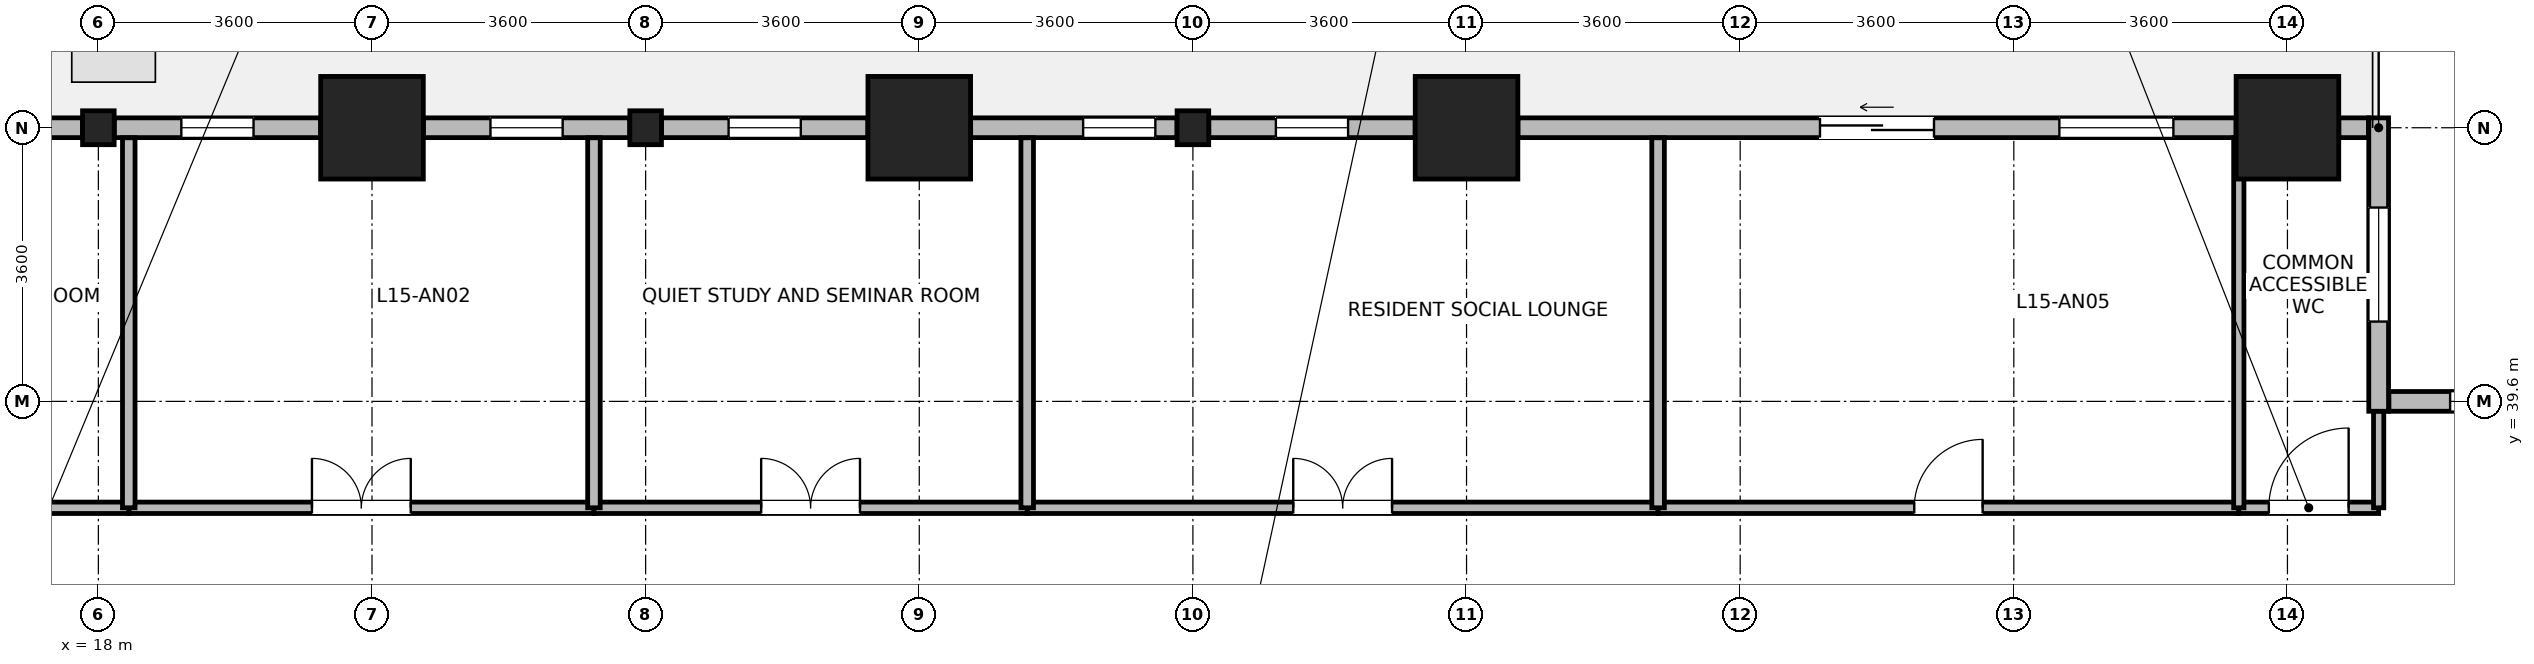
"""IFC4 building model, lengths in metres.
Left out: names, types, materials, properties, quantities, classifications, styles, units other than length and angle.
Written with IfcOpenShell. Run it as: python <this file> out.ifc"""

import sys

from ifc_helpers import new_model, si_unit, direction, frame, frame_2d, origin, origin_2d, place, context, subcontext, project, spatial, rectangle, i_section, extrude, source, transform, mapped, element, fill, save


model = new_model("IFC4")
c1 = context("Model", 3, precision=1e-05, world=origin(), true_north=direction((0.0, 1.0)))
c2 = subcontext(c1, "Body", "Model", "MODEL_VIEW")
j1 = project(units=[si_unit("LENGTHUNIT", "METRE"), si_unit("PLANEANGLEUNIT", "RADIAN")], contexts=[c1])
p1 = place(None, origin())
s1 = spatial("IfcSite", under=j1, at=p1, CompositionType="ELEMENT")
p2 = place(p1, origin())
s2 = spatial("IfcBuilding", under=s1, at=p2, CompositionType="ELEMENT")
p3 = place(p2, frame((0.0, 0.0, 62.3)))
s3 = spatial("IfcBuildingStorey", under=s2, at=p3, CompositionType="ELEMENT", Elevation=62.3)
m1 = source(origin(), c2, "Body", "SweptSolid", [
    extrude(rectangle(XDim=1.35, YDim=1.35, at=origin_2d()), origin(), (0.0, 0.0, 1.0), 3.7),
])
for number, where, z_axis, x_axis in (
    (1, (21.6, 43.2, 0.0), (0.0, 0.0, 1.0), (1.0, 0.0, 0.0)),
    (2, (28.8, 43.2, 0.0), (0.0, 0.0, 1.0), (1.0, 0.0, 0.0)),
    (3, (36.0, 43.2, 0.0), (0.0, 0.0, 1.0), (1.0, 0.0, 0.0)),
    (4, (46.8, 43.2, 0.0), (0.0, 0.0, 1.0), (1.0, 0.0, 0.0)),
):
    element("IfcColumn", number, at=place(p3, frame(where, z_axis=z_axis, x_axis=x_axis)), inside=s3, PredefinedType="COLUMN", context=c2, shape_type="MappedRepresentation", body=[
        mapped(m1, transform((0.0, 0.0, 0.0), x_axis=(1.0, 0.0, 0.0), y_axis=(0.0, 1.0, 0.0), z_axis=(0.0, 0.0, 1.0), scale=1.0)),
    ])
m2 = source(origin(), c2, "Body", "SweptSolid", [
    extrude(i_section(OverallWidth=0.416, OverallDepth=0.446, WebThickness=0.029, FlangeThickness=0.04, FilletRadius=0.015, at=origin_2d()), origin(), (0.0, 0.0, 1.0), 3.7),
])
for number, where, z_axis, x_axis in (
    (5, (18.0, 43.2, 0.0), (0.0, 0.0, 1.0), (1.0, 0.0, 0.0)),
    (6, (25.2, 43.2, 0.0), (0.0, 0.0, 1.0), (1.0, 0.0, 0.0)),
    (7, (32.4, 43.2, 0.0), (0.0, 0.0, 1.0), (1.0, 0.0, 0.0)),
):
    element("IfcColumn", number, at=place(p3, frame(where, z_axis=z_axis, x_axis=x_axis)), inside=s3, PredefinedType="COLUMN", context=c2, shape_type="MappedRepresentation", body=[
        mapped(m2, transform((0.0, 0.0, 0.0), x_axis=(1.0, 0.0, 0.0), y_axis=(0.0, 1.0, 0.0), z_axis=(0.0, 0.0, 1.0), scale=1.0)),
    ])
p4 = place(p3, frame((48.135, 39.6, 0.0), z_axis=(0.0, 0.0, 1.0), x_axis=(1.0, 0.0, 0.0)))
e8 = element("IfcWall", 8, at=p4, inside=s3, PredefinedType="STANDARD", context=c2, shape_type="SweptSolid", body=[
    extrude(rectangle(XDim=9.33, YDim=0.26, at=frame_2d((4.665, 0.0))), origin(), (0.0, 0.0, 1.0), 3.43),
])
p5 = place(p4, frame((0.805, 0.0, 0.85)))
e9 = element("IfcOpeningElement", 9, at=p5, cuts=e8, PredefinedType="OPENING", context=c2, shape_type="SweptSolid", body=[
    extrude(rectangle(XDim=1.5, YDim=1.85, at=frame_2d((0.75, 0.925))), frame((0.0, 0.14, 0.0), z_axis=(0.0, -1.0, 0.0), x_axis=(1.0, 0.0, 0.0)), (0.0, 0.0, 1.0), 0.28),
])
p6 = place(p4, frame((3.915, 0.0, 0.85)))
e10 = element("IfcOpeningElement", 10, at=p6, cuts=e8, PredefinedType="OPENING", context=c2, shape_type="SweptSolid", body=[
    extrude(rectangle(XDim=1.5, YDim=1.85, at=frame_2d((0.75, 0.925))), frame((0.0, 0.14, 0.0), z_axis=(0.0, -1.0, 0.0), x_axis=(1.0, 0.0, 0.0)), (0.0, 0.0, 1.0), 0.28),
])
p7 = place(p4, frame((7.025, 0.0, 0.85)))
e11 = element("IfcOpeningElement", 11, at=p7, cuts=e8, PredefinedType="OPENING", context=c2, shape_type="SweptSolid", body=[
    extrude(rectangle(XDim=1.5, YDim=1.85, at=frame_2d((0.75, 0.925))), frame((0.0, 0.14, 0.0), z_axis=(0.0, -1.0, 0.0), x_axis=(1.0, 0.0, 0.0)), (0.0, 0.0, 1.0), 0.28),
])
p8 = place(p3, frame((48.0, 43.33, 0.0), z_axis=(0.0, 0.0, 1.0), x_axis=(0.0, -1.0, 0.0)))
e12 = element("IfcWall", 12, at=p8, inside=s3, PredefinedType="STANDARD", context=c2, shape_type="SweptSolid", body=[
    extrude(rectangle(XDim=3.86, YDim=0.26, at=frame_2d((1.93, 0.0))), origin(), (0.0, 0.0, 1.0), 3.43),
])
p9 = place(p8, frame((1.18, 0.0, 0.85)))
e13 = element("IfcOpeningElement", 13, at=p9, cuts=e12, PredefinedType="OPENING", context=c2, shape_type="SweptSolid", body=[
    extrude(rectangle(XDim=1.5, YDim=1.85, at=frame_2d((0.75, 0.925))), frame((0.0, 0.14, 0.0), z_axis=(0.0, -1.0, 0.0), x_axis=(1.0, 0.0, 0.0)), (0.0, 0.0, 1.0), 0.28),
])
p10 = place(p3, frame((47.476, 43.2, 0.0), z_axis=(0.0, 0.0, 1.0), x_axis=(1.0, 0.0, 0.0)))
e14 = element("IfcWall", 14, at=p10, inside=s3, PredefinedType="STANDARD", context=c2, shape_type="SweptSolid", body=[
    extrude(rectangle(XDim=0.389, YDim=0.26, at=frame_2d((0.194, 0.0))), origin(), (0.0, 0.0, 1.0), 3.43),
])
p11 = place(p3, frame((36.676, 43.2, 0.0), z_axis=(0.0, 0.0, 1.0), x_axis=(1.0, 0.0, 0.0)))
e15 = element("IfcWall", 15, at=p11, inside=s3, PredefinedType="STANDARD", context=c2, shape_type="SweptSolid", body=[
    extrude(rectangle(XDim=9.448, YDim=0.26, at=frame_2d((4.724, 0.0))), origin(), (0.0, 0.0, 1.0), 2.93),
])
p12 = place(p11, frame((3.974, 0.0, 0.0)))
e16 = element("IfcOpeningElement", 16, at=p12, cuts=e15, PredefinedType="OPENING", context=c2, shape_type="SweptSolid", body=[
    extrude(rectangle(XDim=1.5, YDim=2.15, at=frame_2d((0.75, 1.075))), frame((0.0, 0.14, 0.0), z_axis=(0.0, -1.0, 0.0), x_axis=(1.0, 0.0, 0.0)), (0.0, 0.0, 1.0), 0.28),
])
p13 = place(p11, frame((7.123, 0.0, 0.85)))
e17 = element("IfcOpeningElement", 17, at=p13, cuts=e15, PredefinedType="OPENING", context=c2, shape_type="SweptSolid", body=[
    extrude(rectangle(XDim=1.5, YDim=1.85, at=frame_2d((0.75, 0.925))), frame((0.0, 0.14, 0.0), z_axis=(0.0, -1.0, 0.0), x_axis=(1.0, 0.0, 0.0)), (0.0, 0.0, 1.0), 0.28),
])
p14 = place(p3, frame((32.609, 43.2, 0.0), z_axis=(0.0, 0.0, 1.0), x_axis=(1.0, 0.0, 0.0)))
e18 = element("IfcWall", 18, at=p14, inside=s3, PredefinedType="STANDARD", context=c2, shape_type="SweptSolid", body=[
    extrude(rectangle(XDim=2.715, YDim=0.26, at=frame_2d((1.357, 0.0))), origin(), (0.0, 0.0, 1.0), 2.93),
])
p15 = place(p14, frame((0.883, 0.0, 0.85)))
e19 = element("IfcOpeningElement", 19, at=p15, cuts=e18, PredefinedType="OPENING", context=c2, shape_type="SweptSolid", body=[
    extrude(rectangle(XDim=0.95, YDim=1.75, at=frame_2d((0.475, 0.875))), frame((0.0, 0.14, 0.0), z_axis=(0.0, -1.0, 0.0), x_axis=(1.0, 0.0, 0.0)), (0.0, 0.0, 1.0), 0.28),
])
p16 = place(p3, frame((29.476, 43.2, 0.0), z_axis=(0.0, 0.0, 1.0), x_axis=(1.0, 0.0, 0.0)))
e20 = element("IfcWall", 20, at=p16, inside=s3, PredefinedType="STANDARD", context=c2, shape_type="SweptSolid", body=[
    extrude(rectangle(XDim=2.715, YDim=0.26, at=frame_2d((1.357, 0.0))), origin(), (0.0, 0.0, 1.0), 2.93),
])
p17 = place(p16, frame((1.48, 0.0, 0.85)))
e21 = element("IfcOpeningElement", 21, at=p17, cuts=e20, PredefinedType="OPENING", context=c2, shape_type="SweptSolid", body=[
    extrude(rectangle(XDim=0.95, YDim=1.75, at=frame_2d((0.475, 0.875))), frame((0.0, 0.14, 0.0), z_axis=(0.0, -1.0, 0.0), x_axis=(1.0, 0.0, 0.0)), (0.0, 0.0, 1.0), 0.28),
])
p18 = place(p3, frame((25.409, 43.2, 0.0), z_axis=(0.0, 0.0, 1.0), x_axis=(1.0, 0.0, 0.0)))
e22 = element("IfcWall", 22, at=p18, inside=s3, PredefinedType="STANDARD", context=c2, shape_type="SweptSolid", body=[
    extrude(rectangle(XDim=2.715, YDim=0.26, at=frame_2d((1.357, 0.0))), origin(), (0.0, 0.0, 1.0), 2.93),
])
p19 = place(p18, frame((0.883, 0.0, 0.85)))
e23 = element("IfcOpeningElement", 23, at=p19, cuts=e22, PredefinedType="OPENING", context=c2, shape_type="SweptSolid", body=[
    extrude(rectangle(XDim=0.95, YDim=1.75, at=frame_2d((0.475, 0.875))), frame((0.0, 0.14, 0.0), z_axis=(0.0, -1.0, 0.0), x_axis=(1.0, 0.0, 0.0)), (0.0, 0.0, 1.0), 0.28),
])
p20 = place(p3, frame((22.276, 43.2, 0.0), z_axis=(0.0, 0.0, 1.0), x_axis=(1.0, 0.0, 0.0)))
e24 = element("IfcWall", 24, at=p20, inside=s3, PredefinedType="STANDARD", context=c2, shape_type="SweptSolid", body=[
    extrude(rectangle(XDim=2.715, YDim=0.26, at=frame_2d((1.357, 0.0))), origin(), (0.0, 0.0, 1.0), 2.93),
])
p21 = place(p20, frame((0.883, 0.0, 0.85)))
e25 = element("IfcOpeningElement", 25, at=p21, cuts=e24, PredefinedType="OPENING", context=c2, shape_type="SweptSolid", body=[
    extrude(rectangle(XDim=0.95, YDim=1.75, at=frame_2d((0.475, 0.875))), frame((0.0, 0.14, 0.0), z_axis=(0.0, -1.0, 0.0), x_axis=(1.0, 0.0, 0.0)), (0.0, 0.0, 1.0), 0.28),
])
p22 = place(p3, frame((18.209, 43.2, 0.0), z_axis=(0.0, 0.0, 1.0), x_axis=(1.0, 0.0, 0.0)))
e26 = element("IfcWall", 26, at=p22, inside=s3, PredefinedType="STANDARD", context=c2, shape_type="SweptSolid", body=[
    extrude(rectangle(XDim=2.715, YDim=0.26, at=frame_2d((1.357, 0.0))), origin(), (0.0, 0.0, 1.0), 2.93),
])
p23 = place(p22, frame((0.883, 0.0, 0.85)))
e27 = element("IfcOpeningElement", 27, at=p23, cuts=e26, PredefinedType="OPENING", context=c2, shape_type="SweptSolid", body=[
    extrude(rectangle(XDim=0.95, YDim=1.75, at=frame_2d((0.475, 0.875))), frame((0.0, 0.14, 0.0), z_axis=(0.0, -1.0, 0.0), x_axis=(1.0, 0.0, 0.0)), (0.0, 0.0, 1.0), 0.28),
])
p24 = place(p3, frame((15.076, 43.2, 0.0), z_axis=(0.0, 0.0, 1.0), x_axis=(1.0, 0.0, 0.0)))
e28 = element("IfcWall", 28, at=p24, inside=s3, PredefinedType="STANDARD", context=c2, shape_type="SweptSolid", body=[
    extrude(rectangle(XDim=2.715, YDim=0.26, at=frame_2d((1.357, 0.0))), origin(), (0.0, 0.0, 1.0), 2.93),
])
p25 = place(p24, frame((0.883, 0.0, 0.85)))
e29 = element("IfcOpeningElement", 29, at=p25, cuts=e28, PredefinedType="OPENING", context=c2, shape_type="SweptSolid", body=[
    extrude(rectangle(XDim=0.95, YDim=1.75, at=frame_2d((0.475, 0.875))), frame((0.0, 0.14, 0.0), z_axis=(0.0, -1.0, 0.0), x_axis=(1.0, 0.0, 0.0)), (0.0, 0.0, 1.0), 0.28),
])
p26 = place(p3, frame((30.22, 38.2, 0.0), z_axis=(0.0, 0.0, 1.0), x_axis=(1.0, 0.0, 0.0)))
e30 = element("IfcWall", 30, at=p26, inside=s3, PredefinedType="PARTITIONING", context=c2, shape_type="SweptSolid", body=[
    extrude(rectangle(XDim=8.3, YDim=0.15, at=frame_2d((4.15, 0.0))), origin(), (0.0, 0.0, 1.0), 3.43),
])
p27 = place(p26, frame((3.5, 0.0, 0.0)))
e31 = element("IfcOpeningElement", 31, at=p27, cuts=e30, PredefinedType="OPENING", context=c2, shape_type="SweptSolid", body=[
    extrude(rectangle(XDim=1.3, YDim=2.12, at=frame_2d((0.65, 1.06))), frame((0.0, 0.085, 0.0), z_axis=(0.0, -1.0, 0.0), x_axis=(1.0, 0.0, 0.0)), (0.0, 0.0, 1.0), 0.17),
])
p28 = place(p3, frame((38.52, 38.2, 0.0), z_axis=(0.0, 0.0, 1.0), x_axis=(1.0, 0.0, 0.0)))
e32 = element("IfcWall", 32, at=p28, inside=s3, PredefinedType="PARTITIONING", context=c2, shape_type="SweptSolid", body=[
    extrude(rectangle(XDim=7.64, YDim=0.15, at=frame_2d((3.82, 0.0))), origin(), (0.0, 0.0, 1.0), 3.43),
])
p29 = place(p28, frame((3.37, 0.0, 0.0)))
e33 = element("IfcOpeningElement", 33, at=p29, cuts=e32, PredefinedType="OPENING", context=c2, shape_type="SweptSolid", body=[
    extrude(rectangle(XDim=0.9, YDim=2.08, at=frame_2d((0.45, 1.04))), frame((0.0, 0.085, 0.0), z_axis=(0.0, -1.0, 0.0), x_axis=(1.0, 0.0, 0.0)), (0.0, 0.0, 1.0), 0.17),
])
p30 = place(p3, frame((18.4, 38.2, 0.0), z_axis=(0.0, 0.0, 1.0), x_axis=(1.0, 0.0, 0.0)))
e34 = element("IfcWall", 34, at=p30, inside=s3, PredefinedType="PARTITIONING", context=c2, shape_type="SweptSolid", body=[
    extrude(rectangle(XDim=6.12, YDim=0.15, at=frame_2d((3.06, 0.0))), origin(), (0.0, 0.0, 1.0), 3.43),
])
p31 = place(p30, frame((2.41, 0.0, 0.0)))
e35 = element("IfcOpeningElement", 35, at=p31, cuts=e34, PredefinedType="OPENING", context=c2, shape_type="SweptSolid", body=[
    extrude(rectangle(XDim=1.3, YDim=2.12, at=frame_2d((0.65, 1.06))), frame((0.0, 0.085, 0.0), z_axis=(0.0, -1.0, 0.0), x_axis=(1.0, 0.0, 0.0)), (0.0, 0.0, 1.0), 0.17),
])
p32 = place(p3, frame((24.52, 38.2, 0.0), z_axis=(0.0, 0.0, 1.0), x_axis=(1.0, 0.0, 0.0)))
e36 = element("IfcWall", 36, at=p32, inside=s3, PredefinedType="PARTITIONING", context=c2, shape_type="SweptSolid", body=[
    extrude(rectangle(XDim=5.7, YDim=0.15, at=frame_2d((2.85, 0.0))), origin(), (0.0, 0.0, 1.0), 3.43),
])
p33 = place(p32, frame((2.2, 0.0, 0.0)))
e37 = element("IfcOpeningElement", 37, at=p33, cuts=e36, PredefinedType="OPENING", context=c2, shape_type="SweptSolid", body=[
    extrude(rectangle(XDim=1.3, YDim=2.12, at=frame_2d((0.65, 1.06))), frame((0.0, 0.085, 0.0), z_axis=(0.0, -1.0, 0.0), x_axis=(1.0, 0.0, 0.0)), (0.0, 0.0, 1.0), 0.17),
])
p34 = place(p3, frame((13.2, 38.2, 0.0), z_axis=(0.0, 0.0, 1.0), x_axis=(1.0, 0.0, 0.0)))
e38 = element("IfcWall", 38, at=p34, inside=s3, PredefinedType="PARTITIONING", context=c2, shape_type="SweptSolid", body=[
    extrude(rectangle(XDim=5.2, YDim=0.15, at=frame_2d((2.6, 0.0))), origin(), (0.0, 0.0, 1.0), 3.43),
])
p35 = place(p34, frame((1.95, 0.0, 0.0)))
e39 = element("IfcOpeningElement", 39, at=p35, cuts=e38, PredefinedType="OPENING", context=c2, shape_type="SweptSolid", body=[
    extrude(rectangle(XDim=1.3, YDim=2.12, at=frame_2d((0.65, 1.06))), frame((0.0, 0.085, 0.0), z_axis=(0.0, -1.0, 0.0), x_axis=(1.0, 0.0, 0.0)), (0.0, 0.0, 1.0), 0.17),
])
p36 = place(p3, frame((46.16, 38.2, 0.0), z_axis=(0.0, 0.0, 1.0), x_axis=(1.0, 0.0, 0.0)))
e40 = element("IfcWall", 40, at=p36, inside=s3, PredefinedType="PARTITIONING", context=c2, shape_type="SweptSolid", body=[
    extrude(rectangle(XDim=1.84, YDim=0.15, at=frame_2d((0.92, 0.0))), origin(), (0.0, 0.0, 1.0), 3.43),
])
p37 = place(p36, frame((0.395, 0.0, 0.0)))
e41 = element("IfcOpeningElement", 41, at=p37, cuts=e40, PredefinedType="OPENING", context=c2, shape_type="SweptSolid", body=[
    extrude(rectangle(XDim=1.05, YDim=2.12, at=frame_2d((0.525, 1.06))), frame((0.0, 0.085, 0.0), z_axis=(0.0, -1.0, 0.0), x_axis=(1.0, 0.0, 0.0)), (0.0, 0.0, 1.0), 0.17),
])
for number, where, z_axis, x_axis in (
    (42, (18.4, 38.2, 0.0), (0.0, 0.0, 1.0), (0.0, 1.0, 0.0)),
    (43, (24.52, 38.2, 0.0), (0.0, 0.0, 1.0), (0.0, 1.0, 0.0)),
    (44, (30.22, 38.2, 0.0), (0.0, 0.0, 1.0), (0.0, 1.0, 0.0)),
    (45, (38.52, 38.2, 0.0), (0.0, 0.0, 1.0), (0.0, 1.0, 0.0)),
):
    element("IfcWall", number, at=place(p3, frame(where, z_axis=z_axis, x_axis=x_axis)), inside=s3, PredefinedType="PARTITIONING", context=c2, shape_type="SweptSolid", body=[
        extrude(rectangle(XDim=4.868, YDim=0.165, at=frame_2d((2.434, 0.0))), origin(), (0.0, 0.0, 1.0), 3.43),
    ])
p38 = place(p3, frame((46.16, 38.2, 0.0), z_axis=(0.0, 0.0, 1.0), x_axis=(0.0, 1.0, 0.0)))
e46 = element("IfcWall", 46, at=p38, inside=s3, PredefinedType="PARTITIONING", context=c2, shape_type="SweptSolid", body=[
    extrude(rectangle(XDim=4.868, YDim=0.135, at=frame_2d((2.434, 0.0))), origin(), (0.0, 0.0, 1.0), 3.43),
])
p39 = place(p3, frame((48.0, 38.2, 0.0), z_axis=(0.0, 0.0, 1.0), x_axis=(0.0, 1.0, 0.0)))
e47 = element("IfcWall", 47, at=p39, inside=s3, PredefinedType="PARTITIONING", context=c2, shape_type="SweptSolid", body=[
    extrude(rectangle(XDim=1.268, YDim=0.135, at=frame_2d((0.634, 0.0))), origin(), (0.0, 0.0, 1.0), 3.43),
])
p40 = place(p5, origin())
e48 = element("IfcWindow", 48, at=p40, inside=s3, PartitioningType="SINGLE_PANEL", PredefinedType="WINDOW", context=c2, shape_type="SweptSolid", body=[
    extrude(rectangle(XDim=1.5, YDim=1.85, at=frame_2d((0.75, 0.925))), frame((0.0, 0.03, 0.0), z_axis=(0.0, -1.0, 0.0), x_axis=(1.0, 0.0, 0.0)), (0.0, 0.0, 1.0), 0.06),
])
fill(e9, e48)
p41 = place(p9, origin())
e49 = element("IfcWindow", 49, at=p41, inside=s3, PartitioningType="SINGLE_PANEL", PredefinedType="WINDOW", context=c2, shape_type="SweptSolid", body=[
    extrude(rectangle(XDim=1.5, YDim=1.85, at=frame_2d((0.75, 0.925))), frame((0.0, 0.03, 0.0), z_axis=(0.0, -1.0, 0.0), x_axis=(1.0, 0.0, 0.0)), (0.0, 0.0, 1.0), 0.06),
])
fill(e13, e49)
p42 = place(p12, origin())
e50 = element("IfcDoor", 50, at=p42, inside=s3, OperationType="SLIDING_TO_LEFT", PredefinedType="DOOR", context=c2, shape_type="SweptSolid", body=[
    extrude(rectangle(XDim=1.5, YDim=2.15, at=frame_2d((0.75, 1.075))), frame((0.0, 0.025, 0.0), z_axis=(0.0, -1.0, 0.0), x_axis=(1.0, 0.0, 0.0)), (0.0, 0.0, 1.0), 0.05),
])
fill(e16, e50)
p43 = place(p13, origin())
e51 = element("IfcWindow", 51, at=p43, inside=s3, PartitioningType="SINGLE_PANEL", PredefinedType="WINDOW", context=c2, shape_type="SweptSolid", body=[
    extrude(rectangle(XDim=1.5, YDim=1.85, at=frame_2d((0.75, 0.925))), frame((0.0, 0.03, 0.0), z_axis=(0.0, -1.0, 0.0), x_axis=(1.0, 0.0, 0.0)), (0.0, 0.0, 1.0), 0.06),
])
fill(e17, e51)
p44 = place(p15, origin())
e52 = element("IfcWindow", 52, at=p44, inside=s3, PartitioningType="SINGLE_PANEL", PredefinedType="WINDOW", context=c2, shape_type="SweptSolid", body=[
    extrude(rectangle(XDim=0.95, YDim=1.75, at=frame_2d((0.475, 0.875))), frame((0.0, 0.03, 0.0), z_axis=(0.0, -1.0, 0.0), x_axis=(1.0, 0.0, 0.0)), (0.0, 0.0, 1.0), 0.06),
])
fill(e19, e52)
p45 = place(p17, origin())
e53 = element("IfcWindow", 53, at=p45, inside=s3, PartitioningType="SINGLE_PANEL", PredefinedType="WINDOW", context=c2, shape_type="SweptSolid", body=[
    extrude(rectangle(XDim=0.95, YDim=1.75, at=frame_2d((0.475, 0.875))), frame((0.0, 0.03, 0.0), z_axis=(0.0, -1.0, 0.0), x_axis=(1.0, 0.0, 0.0)), (0.0, 0.0, 1.0), 0.06),
])
fill(e21, e53)
p46 = place(p19, origin())
e54 = element("IfcWindow", 54, at=p46, inside=s3, PartitioningType="SINGLE_PANEL", PredefinedType="WINDOW", context=c2, shape_type="SweptSolid", body=[
    extrude(rectangle(XDim=0.95, YDim=1.75, at=frame_2d((0.475, 0.875))), frame((0.0, 0.03, 0.0), z_axis=(0.0, -1.0, 0.0), x_axis=(1.0, 0.0, 0.0)), (0.0, 0.0, 1.0), 0.06),
])
fill(e23, e54)
p47 = place(p21, origin())
e55 = element("IfcWindow", 55, at=p47, inside=s3, PartitioningType="SINGLE_PANEL", PredefinedType="WINDOW", context=c2, shape_type="SweptSolid", body=[
    extrude(rectangle(XDim=0.95, YDim=1.75, at=frame_2d((0.475, 0.875))), frame((0.0, 0.03, 0.0), z_axis=(0.0, -1.0, 0.0), x_axis=(1.0, 0.0, 0.0)), (0.0, 0.0, 1.0), 0.06),
])
fill(e25, e55)
p48 = place(p23, origin())
e56 = element("IfcWindow", 56, at=p48, inside=s3, PartitioningType="SINGLE_PANEL", PredefinedType="WINDOW", context=c2, shape_type="SweptSolid", body=[
    extrude(rectangle(XDim=0.95, YDim=1.75, at=frame_2d((0.475, 0.875))), frame((0.0, 0.03, 0.0), z_axis=(0.0, -1.0, 0.0), x_axis=(1.0, 0.0, 0.0)), (0.0, 0.0, 1.0), 0.06),
])
fill(e27, e56)
p49 = place(p27, origin())
e57 = element("IfcDoor", 57, at=p49, inside=s3, OperationType="DOUBLE_DOOR_SINGLE_SWING", PredefinedType="DOOR", context=c2, shape_type="SweptSolid", body=[
    extrude(rectangle(XDim=1.3, YDim=2.12, at=frame_2d((0.65, 1.06))), frame((0.0, 0.025, 0.0), z_axis=(0.0, -1.0, 0.0), x_axis=(1.0, 0.0, 0.0)), (0.0, 0.0, 1.0), 0.05),
])
fill(e31, e57)
p50 = place(p29, origin())
e58 = element("IfcDoor", 58, at=p50, inside=s3, OperationType="SINGLE_SWING_RIGHT", PredefinedType="DOOR", context=c2, shape_type="SweptSolid", body=[
    extrude(rectangle(XDim=0.9, YDim=2.08, at=frame_2d((0.45, 1.04))), frame((0.0, 0.025, 0.0), z_axis=(0.0, -1.0, 0.0), x_axis=(1.0, 0.0, 0.0)), (0.0, 0.0, 1.0), 0.05),
])
fill(e33, e58)
p51 = place(p31, origin())
e59 = element("IfcDoor", 59, at=p51, inside=s3, OperationType="DOUBLE_DOOR_SINGLE_SWING", PredefinedType="DOOR", context=c2, shape_type="SweptSolid", body=[
    extrude(rectangle(XDim=1.3, YDim=2.12, at=frame_2d((0.65, 1.06))), frame((0.0, 0.025, 0.0), z_axis=(0.0, -1.0, 0.0), x_axis=(1.0, 0.0, 0.0)), (0.0, 0.0, 1.0), 0.05),
])
fill(e35, e59)
p52 = place(p33, origin())
e60 = element("IfcDoor", 60, at=p52, inside=s3, OperationType="DOUBLE_DOOR_SINGLE_SWING", PredefinedType="DOOR", context=c2, shape_type="SweptSolid", body=[
    extrude(rectangle(XDim=1.3, YDim=2.12, at=frame_2d((0.65, 1.06))), frame((0.0, 0.025, 0.0), z_axis=(0.0, -1.0, 0.0), x_axis=(1.0, 0.0, 0.0)), (0.0, 0.0, 1.0), 0.05),
])
fill(e37, e60)
p53 = place(p37, origin())
e61 = element("IfcDoor", 61, at=p53, inside=s3, OperationType="SINGLE_SWING_RIGHT", PredefinedType="DOOR", context=c2, shape_type="SweptSolid", body=[
    extrude(rectangle(XDim=1.05, YDim=2.12, at=frame_2d((0.525, 1.06))), frame((0.0, 0.025, 0.0), z_axis=(0.0, -1.0, 0.0), x_axis=(1.0, 0.0, 0.0)), (0.0, 0.0, 1.0), 0.05),
])
fill(e41, e61)
save(model, sys.argv[1])
